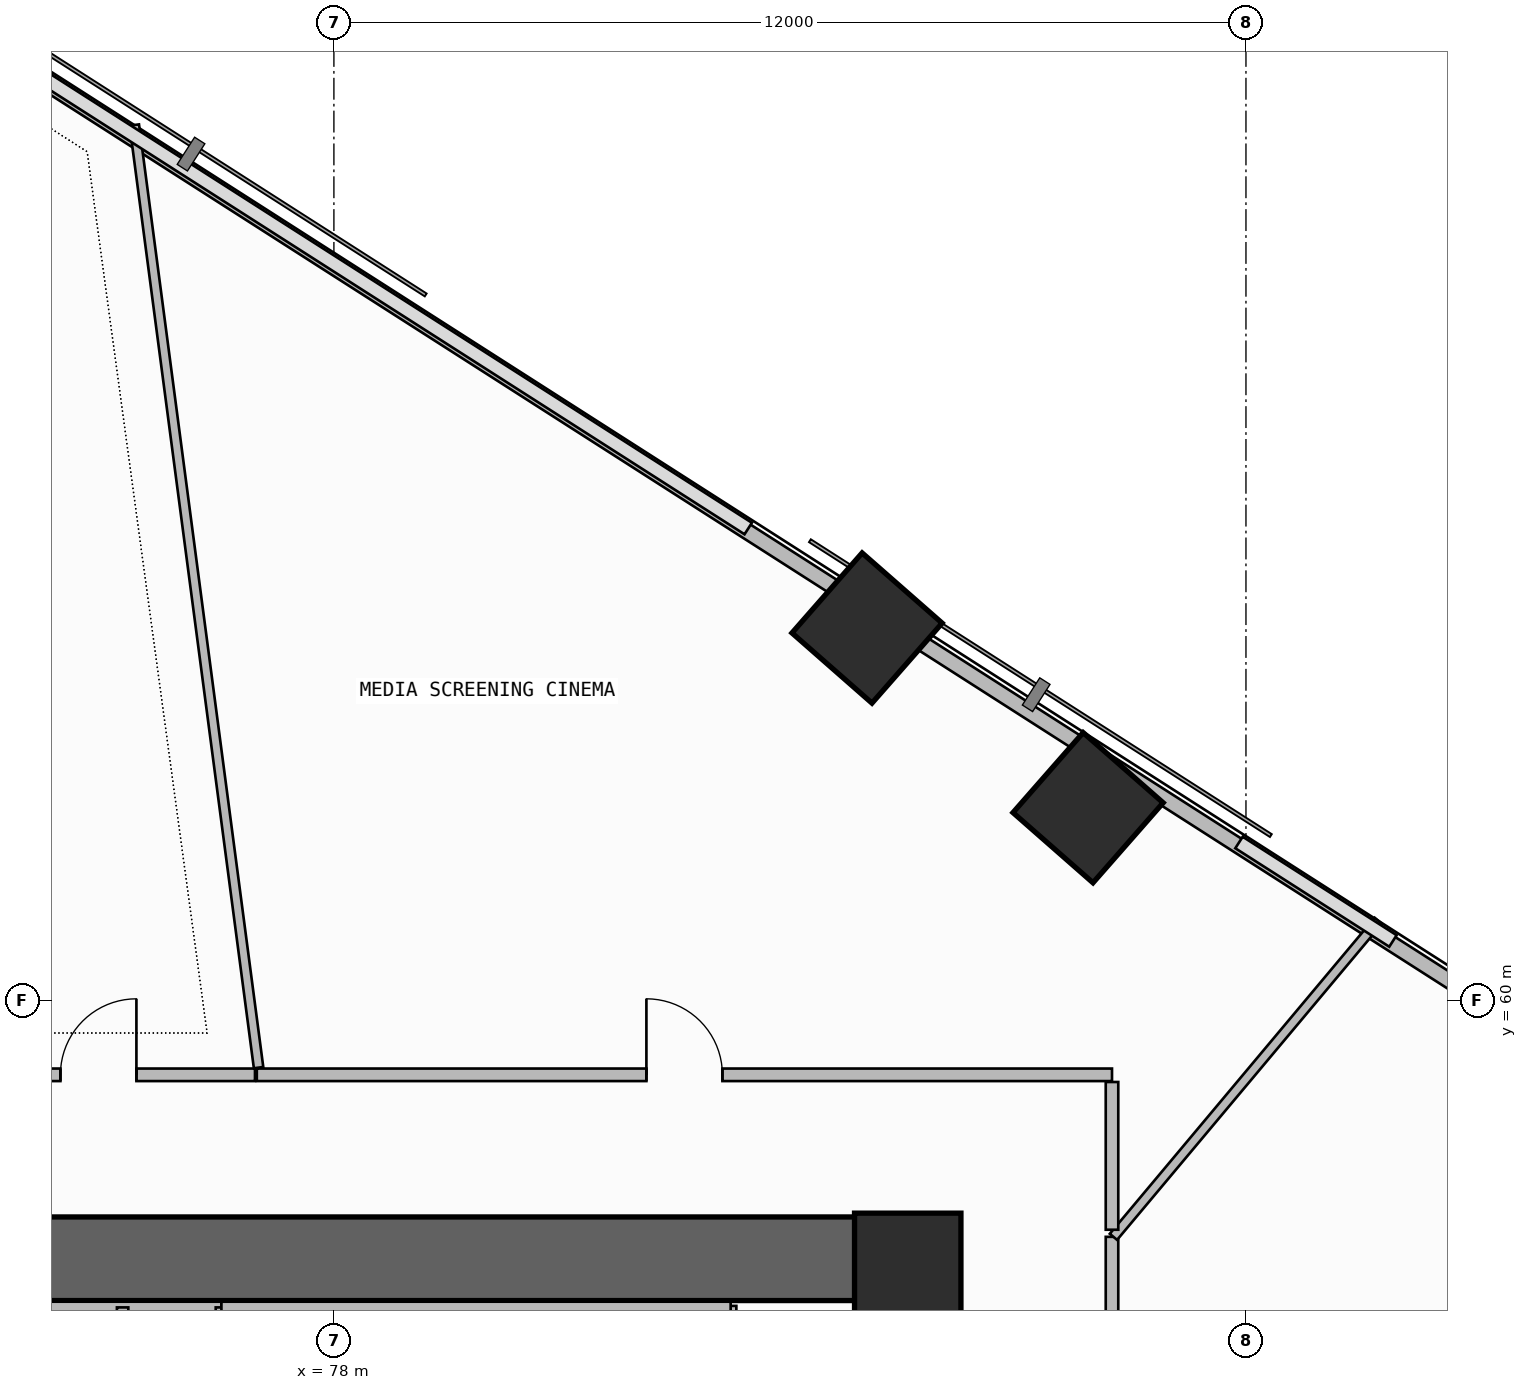
"""IFC4 building model, lengths in metres.
Left out: names, types, materials, properties, quantities, classifications, styles, units other than length and angle.
Written with IfcOpenShell. Run it as: python <this file> out.ifc"""

import sys

from ifc_helpers import new_model, si_unit, direction, frame, frame_2d, origin, origin_2d, place, context, subcontext, project, spatial, rectangle, extrude, element, fill, save


model = new_model("IFC4")
c1 = context("Model", 3, precision=1e-05, world=origin(), true_north=direction((0.0, 1.0)))
c2 = subcontext(c1, "Body", "Model", "MODEL_VIEW")
j1 = project(units=[si_unit("LENGTHUNIT", "METRE"), si_unit("PLANEANGLEUNIT", "RADIAN")], contexts=[c1])
p1 = place(None, origin())
s1 = spatial("IfcSite", under=j1, at=p1, CompositionType="ELEMENT")
p2 = place(p1, origin())
s2 = spatial("IfcBuilding", under=s1, at=p2, CompositionType="ELEMENT")
p3 = place(p2, frame((0.0, 0.0, 66.9)))
s3 = spatial("IfcBuildingStorey", under=s2, at=p3, CompositionType="ELEMENT", Elevation=66.9)
p4 = place(p3, frame((71.8, 56.6, -0.26), z_axis=(0.0, 0.0, 1.0), x_axis=(1.0, 0.0, 0.0)))
e1 = element("IfcWall", 1, at=p4, inside=s3, PredefinedType="SHEAR", context=c2, shape_type="SweptSolid", body=[
    extrude(rectangle(XDim=14.3, YDim=1.1, at=frame_2d((7.15, 0.0))), origin(), (0.0, 0.0, 1.0), 3.6),
])
p5 = place(p3, frame((85.55, 47.6, -0.26), z_axis=(0.0, 0.0, 1.0), x_axis=(0.0, 1.0, 0.0)))
e2 = element("IfcWall", 2, at=p5, inside=s3, PredefinedType="SHEAR", context=c2, shape_type="SweptSolid", body=[
    extrude(rectangle(XDim=8.45, YDim=1.1, at=frame_2d((4.225, 0.0))), origin(), (0.0, 0.0, 1.0), 3.6),
])
for number, where, z_axis, x_axis in (
    (3, (85.55, 56.5, 0.0), (0.0, 0.0, 1.0), (1.0, 0.0, 0.0)),
    (4, (87.923, 62.534, 0.0), (0.0, 0.0, 1.0), (0.659, 0.752, 0.0)),
    (5, (85.015, 64.898, 0.0), (0.0, 0.0, 1.0), (0.659, 0.752, 0.0)),
):
    element("IfcColumn", number, at=place(p3, frame(where, z_axis=z_axis, x_axis=x_axis)), inside=s3, PredefinedType="COLUMN", context=c2, shape_type="SweptSolid", body=[
        extrude(rectangle(XDim=1.4, YDim=1.4, at=origin_2d()), origin(), (0.0, 0.0, 1.0), 3.6),
    ])
p6 = place(p3, frame((93.176, 59.939, 0.0), z_axis=(0.0, 0.0, 1.0), x_axis=(-0.842413081081, 0.538832256666, 0.0)))
e6 = element("IfcWall", 6, at=p6, inside=s3, PredefinedType="PARAPET", context=c2, shape_type="SweptSolid", body=[
    extrude(rectangle(XDim=9.011, YDim=0.2, at=frame_2d((4.505, 0.0))), origin(), (0.0, 0.0, 1.0), 1.15),
])
p7 = place(p3, frame((84.682, 65.372, 0.0), z_axis=(0.0, 0.0, 1.0), x_axis=(-0.842418773655, 0.538823356763, 0.0)))
e7 = element("IfcWall", 7, at=p7, inside=s3, PredefinedType="PARAPET", context=c2, shape_type="SweptSolid", body=[
    extrude(rectangle(XDim=19.612, YDim=0.2, at=frame_2d((9.806, 0.0))), origin(), (0.0, 0.0, 1.0), 1.15),
])
p8 = place(p3, frame((73.02, 55.96, 0.0), z_axis=(0.0, 0.0, 1.0), x_axis=(1.0, 0.0, 0.0)))
e8 = element("IfcWall", 8, at=p8, inside=s3, PredefinedType="SOLIDWALL", context=c2, shape_type="SweptSolid", body=[
    extrude(rectangle(XDim=3.5, YDim=0.15, at=frame_2d((1.75, 0.0))), origin(), (0.0, 0.0, 1.0), 3.34),
])
p9 = place(p3, frame((76.52, 54.02, 0.0), z_axis=(0.0, 0.0, 1.0), x_axis=(0.0, 1.0, 0.0)))
e9 = element("IfcWall", 9, at=p9, inside=s3, PredefinedType="SOLIDWALL", context=c2, shape_type="SweptSolid", body=[
    extrude(rectangle(XDim=1.94, YDim=0.15, at=frame_2d((0.97, 0.0))), origin(), (0.0, 0.0, 1.0), 3.34),
])
p10 = place(p3, frame((75.22, 54.02, 0.0), z_axis=(0.0, 0.0, 1.0), x_axis=(0.0, 1.0, 0.0)))
e10 = element("IfcWall", 10, at=p10, inside=s3, PredefinedType="PLUMBINGWALL", context=c2, shape_type="SweptSolid", body=[
    extrude(rectangle(XDim=1.94, YDim=0.15, at=frame_2d((0.97, 0.0))), origin(), (0.0, 0.0, 1.0), 3.34),
])
for number, where, z_axis, x_axis in (
    (11, (78.75, 54.02, 0.0), (0.0, 0.0, 1.0), (0.0, 1.0, 0.0)),
    (12, (81.0, 54.02, 0.0), (0.0, 0.0, 1.0), (0.0, 1.0, 0.0)),
):
    element("IfcWall", number, at=place(p3, frame(where, z_axis=z_axis, x_axis=x_axis)), inside=s3, PredefinedType="PLUMBINGWALL", context=c2, shape_type="SweptSolid", body=[
        extrude(rectangle(XDim=1.96, YDim=0.15, at=frame_2d((0.98, 0.0))), origin(), (0.0, 0.0, 1.0), 3.34),
    ])
p11 = place(p3, frame((83.22, 54.02, 0.0), z_axis=(0.0, 0.0, 1.0), x_axis=(0.0, 1.0, 0.0)))
e13 = element("IfcWall", 13, at=p11, inside=s3, PredefinedType="SOLIDWALL", context=c2, shape_type="SweptSolid", body=[
    extrude(rectangle(XDim=1.96, YDim=0.15, at=frame_2d((0.98, 0.0))), origin(), (0.0, 0.0, 1.0), 3.34),
])
p12 = place(p3, frame((76.52, 55.96, 0.0), z_axis=(0.0, 0.0, 1.0), x_axis=(1.0, 0.0, 0.0)))
e14 = element("IfcWall", 14, at=p12, inside=s3, PredefinedType="SOLIDWALL", context=c2, shape_type="SweptSolid", body=[
    extrude(rectangle(XDim=6.7, YDim=0.15, at=frame_2d((3.35, 0.0))), origin(), (0.0, 0.0, 1.0), 3.34),
])
p13 = place(p3, frame((88.238, 47.957, 0.0), z_axis=(0.0, 0.0, 1.0), x_axis=(0.0, 1.0, 0.0)))
e15 = element("IfcWall", 15, at=p13, inside=s3, PredefinedType="PARTITIONING", context=c2, shape_type="SweptSolid", body=[
    extrude(rectangle(XDim=8.932, YDim=0.165, at=frame_2d((4.466, 0.0))), origin(), (0.0, 0.0, 1.0), 2.725),
])
p14 = place(p13, frame((3.966, 0.0, 0.0)))
e16 = element("IfcOpeningElement", 16, at=p14, cuts=e15, PredefinedType="OPENING", context=c2, shape_type="SweptSolid", body=[
    extrude(rectangle(XDim=1.0, YDim=2.2, at=frame_2d((0.5, 1.1))), frame((0.0, 0.093, 0.0), z_axis=(0.0, -1.0, 0.0), x_axis=(1.0, 0.0, 0.0)), (0.0, 0.0, 1.0), 0.185),
])
p15 = place(p3, frame((88.256, 56.888, 0.0), z_axis=(0.0, 0.0, 1.0), x_axis=(0.64232418619, 0.766433062854, 0.0)))
e17 = element("IfcWall", 17, at=p15, inside=s3, PredefinedType="PARTITIONING", context=c2, shape_type="SweptSolid", body=[
    extrude(rectangle(XDim=5.425, YDim=0.125, at=frame_2d((2.713, 0.0))), origin(), (0.0, 0.0, 1.0), 2.725),
])
p16 = place(p3, frame((88.238, 59.02, 0.0), z_axis=(0.0, 0.0, 1.0), x_axis=(-1.0, 0.0, 0.0)))
e18 = element("IfcWall", 18, at=p16, inside=s3, PredefinedType="PARTITIONING", context=c2, shape_type="SweptSolid", body=[
    extrude(rectangle(XDim=11.252, YDim=0.165, at=frame_2d((5.626, 0.0))), origin(), (0.0, 0.0, 1.0), 2.725),
])
p17 = place(p16, frame((5.126, 0.0, 0.0)))
e19 = element("IfcOpeningElement", 19, at=p17, cuts=e18, PredefinedType="OPENING", context=c2, shape_type="SweptSolid", body=[
    extrude(rectangle(XDim=1.0, YDim=2.2, at=frame_2d((0.5, 1.1))), frame((0.0, 0.093, 0.0), z_axis=(0.0, -1.0, 0.0), x_axis=(1.0, 0.0, 0.0)), (0.0, 0.0, 1.0), 0.185),
])
p18 = place(p3, frame((88.238, 56.982, 0.0), z_axis=(0.0, 0.0, 1.0), x_axis=(0.0, 1.0, 0.0)))
e20 = element("IfcWall", 20, at=p18, inside=s3, PredefinedType="PARTITIONING", context=c2, shape_type="SweptSolid", body=[
    extrude(rectangle(XDim=1.944, YDim=0.165, at=frame_2d((0.972, 0.0))), origin(), (0.0, 0.0, 1.0), 2.875),
])
p19 = place(p3, frame((77.009, 59.115, 0.0), z_axis=(0.0, 0.0, 1.0), x_axis=(-0.130712508062, 0.991420314617, 0.0)))
e21 = element("IfcWall", 21, at=p19, inside=s3, PredefinedType="PARTITIONING", context=c2, shape_type="SweptSolid", body=[
    extrude(rectangle(XDim=12.509, YDim=0.125, at=frame_2d((6.254, 0.0))), origin(), (0.0, 0.0, 1.0), 2.875),
])
p20 = place(p3, frame((76.961, 59.02, 0.0), z_axis=(0.0, 0.0, 1.0), x_axis=(-1.0, 0.0, 0.0)))
e22 = element("IfcWall", 22, at=p20, inside=s3, PredefinedType="PARTITIONING", context=c2, shape_type="SweptSolid", body=[
    extrude(rectangle(XDim=7.582, YDim=0.165, at=frame_2d((3.791, 0.0))), origin(), (0.0, 0.0, 1.0), 2.725),
])
p21 = place(p20, frame((1.56, 0.0, 0.0)))
e23 = element("IfcOpeningElement", 23, at=p21, cuts=e22, PredefinedType="OPENING", context=c2, shape_type="SweptSolid", body=[
    extrude(rectangle(XDim=1.0, YDim=2.2, at=frame_2d((0.5, 1.1))), frame((0.0, 0.093, 0.0), z_axis=(0.0, -1.0, 0.0), x_axis=(1.0, 0.0, 0.0)), (0.0, 0.0, 1.0), 0.185),
])
p22 = place(p17, frame((1.0, 0.0, 0.0), z_axis=(0.0, 0.0, 1.0), x_axis=(-1.0, 0.0, 0.0)))
e24 = element("IfcDoor", 24, at=p22, inside=s3, OperationType="SINGLE_SWING_LEFT", PredefinedType="DOOR", context=c2, shape_type="SweptSolid", body=[
    extrude(rectangle(XDim=1.0, YDim=2.2, at=frame_2d((0.5, 1.1))), frame((0.0, 0.025, 0.0), z_axis=(0.0, -1.0, 0.0), x_axis=(1.0, 0.0, 0.0)), (0.0, 0.0, 1.0), 0.05),
])
fill(e19, e24)
p23 = place(p21, frame((1.0, 0.0, 0.0), z_axis=(0.0, 0.0, 1.0), x_axis=(-1.0, 0.0, 0.0)))
e25 = element("IfcDoor", 25, at=p23, inside=s3, OperationType="SINGLE_SWING_RIGHT", PredefinedType="DOOR", context=c2, shape_type="SweptSolid", body=[
    extrude(rectangle(XDim=1.0, YDim=2.2, at=frame_2d((0.5, 1.1))), frame((0.0, 0.025, 0.0), z_axis=(0.0, -1.0, 0.0), x_axis=(1.0, 0.0, 0.0)), (0.0, 0.0, 1.0), 0.05),
])
fill(e23, e25)
save(model, sys.argv[1])
